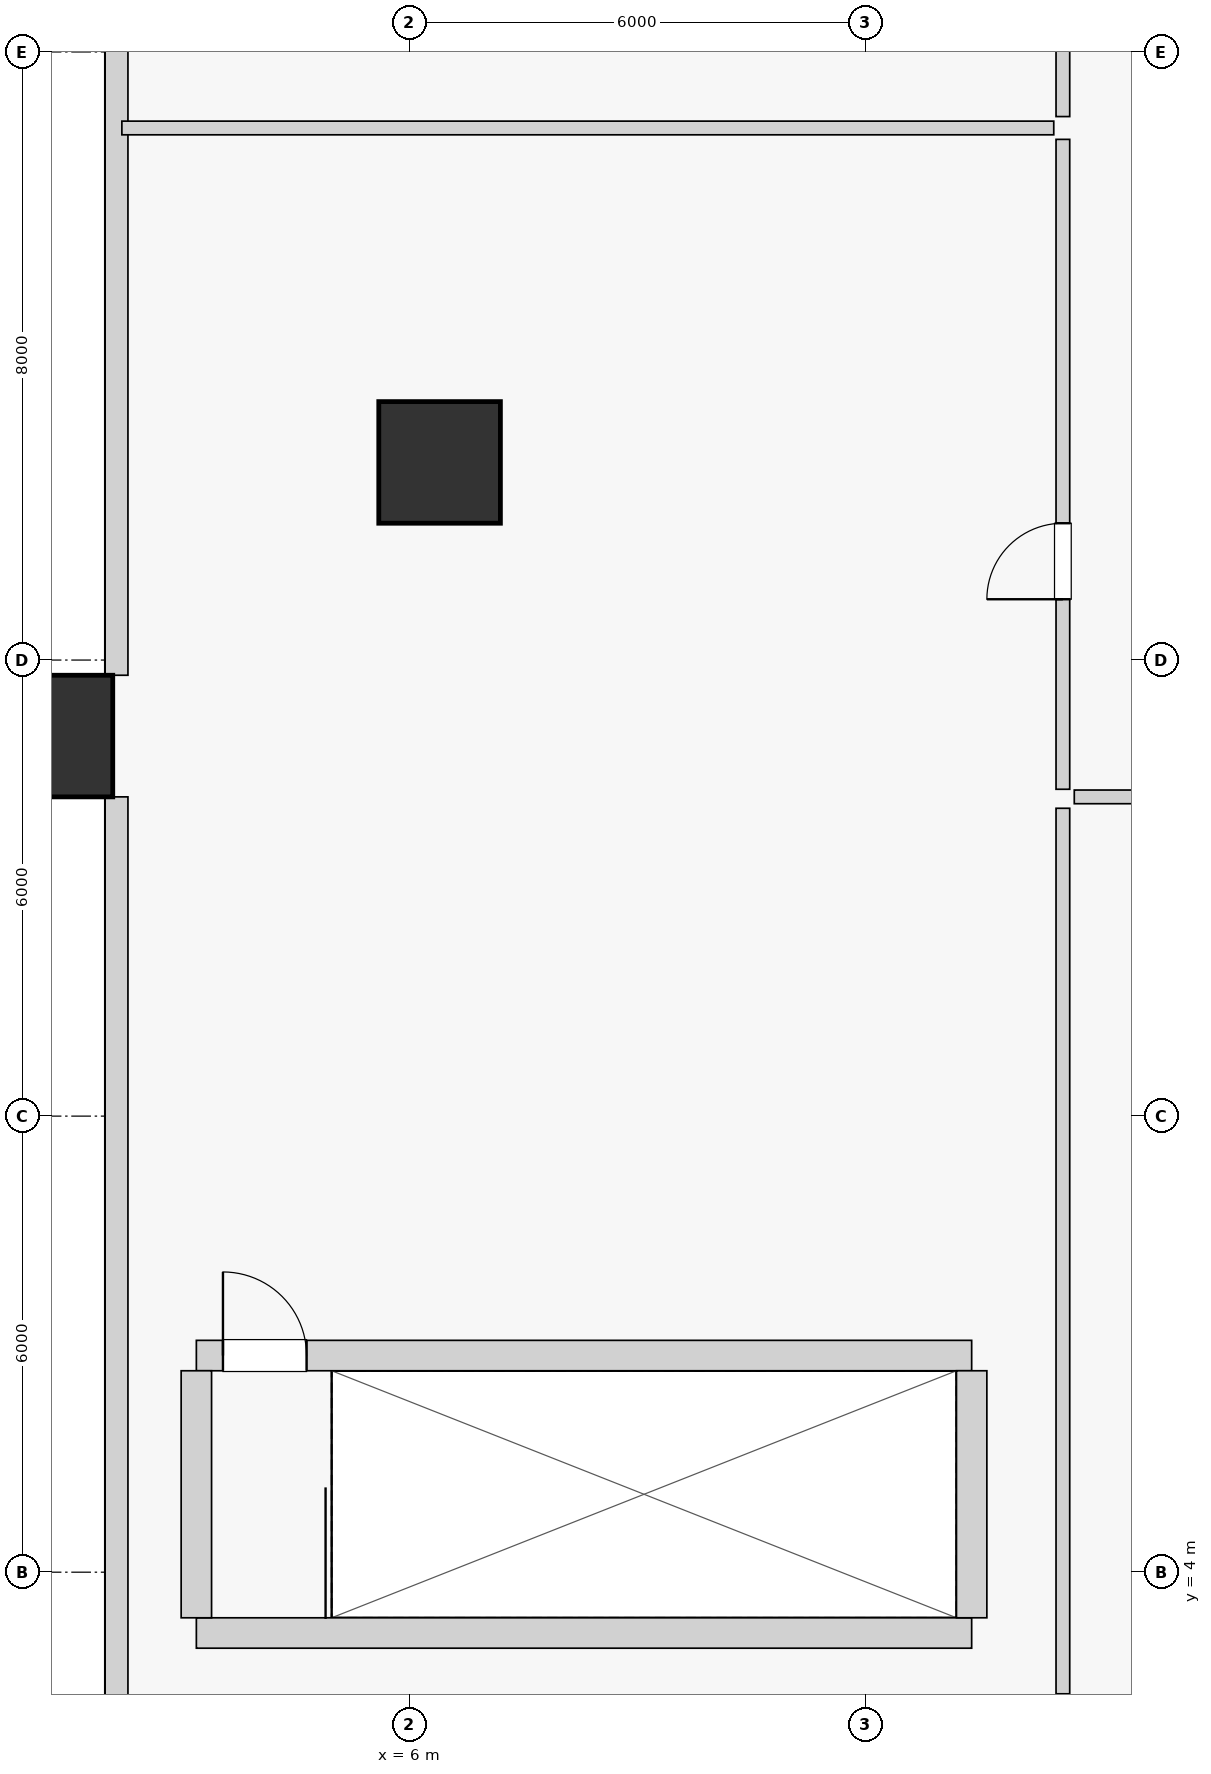
"""IFC4 building model, lengths in metres.
Left out: names, types, materials, properties, quantities, classifications, styles, units other than length and angle.
Written with IfcOpenShell. Run it as: python <this file> out.ifc"""

import sys

from ifc_helpers import new_model, si_unit, direction, frame, frame_2d, origin, origin_2d, place, context, subcontext, project, spatial, rectangle, extrude, source, transform, mapped, element, fill, save


model = new_model("IFC4")
c1 = context("Model", 3, precision=1e-05, world=origin(), true_north=direction((0.0, 1.0)))
c2 = subcontext(c1, "Body", "Model", "MODEL_VIEW")
j1 = project(units=[si_unit("LENGTHUNIT", "METRE"), si_unit("PLANEANGLEUNIT", "RADIAN")], contexts=[c1])
p1 = place(None, origin())
s1 = spatial("IfcSite", under=j1, at=p1, CompositionType="ELEMENT")
p2 = place(p1, origin())
s2 = spatial("IfcBuilding", under=s1, at=p2, CompositionType="ELEMENT")
p3 = place(p2, frame((0.0, 0.0, 18.4)))
s3 = spatial("IfcBuildingStorey", under=s2, at=p3, CompositionType="ELEMENT", Elevation=18.4)
for number, where, z_axis, x_axis in (
    (1, (1.3, 15.0, 0.0), (0.0, 0.0, 1.0), (1.0, 0.0, 0.0)),
    (2, (6.4, 18.6, 0.0), (0.0, 0.0, 1.0), (1.0, 0.0, 0.0)),
):
    element("IfcColumn", number, at=place(p3, frame(where, z_axis=z_axis, x_axis=x_axis)), inside=s3, PredefinedType="COLUMN", context=c2, shape_type="SweptSolid", body=[
        extrude(rectangle(XDim=1.6, YDim=1.6, at=origin_2d()), origin(), (0.0, 0.0, 1.0), 4.4),
    ])
p4 = place(p3, frame((2.15, 32.2, 0.0), z_axis=(0.0, 0.0, 1.0), x_axis=(0.0, -1.0, 0.0)))
e3 = element("IfcWall", 3, at=p4, inside=s3, PredefinedType="SOLIDWALL", context=c2, shape_type="SweptSolid", body=[
    extrude(rectangle(XDim=16.4, YDim=0.3, at=frame_2d((8.2, 0.0))), origin(), (0.0, 0.0, 1.0), 2.95),
])
p5 = place(p4, frame((7.15, 0.0, 0.85)))
e4 = element("IfcOpeningElement", 4, at=p5, cuts=e3, PredefinedType="OPENING", context=c2, shape_type="SweptSolid", body=[
    extrude(rectangle(XDim=2.1, YDim=1.75, at=frame_2d((1.05, 0.875))), frame((0.0, 0.16, 0.0), z_axis=(0.0, -1.0, 0.0), x_axis=(1.0, 0.0, 0.0)), (0.0, 0.0, 1.0), 0.32),
])
p6 = place(p3, frame((2.15, 14.2, 0.0), z_axis=(0.0, 0.0, 1.0), x_axis=(0.0, -1.0, 0.0)))
e5 = element("IfcWall", 5, at=p6, inside=s3, PredefinedType="SOLIDWALL", context=c2, shape_type="SweptSolid", body=[
    extrude(rectangle(XDim=11.9, YDim=0.3, at=frame_2d((5.95, 0.0))), origin(), (0.0, 0.0, 1.0), 2.95),
])
p7 = place(p6, frame((4.75, 0.0, 0.85)))
e6 = element("IfcOpeningElement", 6, at=p7, cuts=e5, PredefinedType="OPENING", context=c2, shape_type="SweptSolid", body=[
    extrude(rectangle(XDim=2.1, YDim=1.75, at=frame_2d((1.05, 0.875))), frame((0.0, 0.16, 0.0), z_axis=(0.0, -1.0, 0.0), x_axis=(1.0, 0.0, 0.0)), (0.0, 0.0, 1.0), 0.32),
])
p8 = place(p3, frame((3.2, 3.2, 0.0), z_axis=(0.0, 0.0, 1.0), x_axis=(1.0, 0.0, 0.0)))
e7 = element("IfcWall", 7, at=p8, inside=s3, PredefinedType="SHEAR", context=c2, shape_type="SweptSolid", body=[
    extrude(rectangle(XDim=10.2, YDim=0.4, at=frame_2d((5.1, 0.0))), origin(), (0.0, 0.0, 1.0), 4.05),
])
p9 = place(p3, frame((3.2, 6.85, 0.0), z_axis=(0.0, 0.0, 1.0), x_axis=(1.0, 0.0, 0.0)))
e8 = element("IfcWall", 8, at=p9, inside=s3, PredefinedType="SHEAR", context=c2, shape_type="SweptSolid", body=[
    extrude(rectangle(XDim=10.2, YDim=0.4, at=frame_2d((5.1, 0.0))), origin(), (0.0, 0.0, 1.0), 4.05),
])
p10 = place(p9, frame((0.35, 0.0, 0.0)))
e9 = element("IfcOpeningElement", 9, at=p10, cuts=e8, PredefinedType="OPENING", context=c2, shape_type="SweptSolid", body=[
    extrude(rectangle(XDim=1.1, YDim=2.03, at=frame_2d((0.55, 1.015))), frame((0.0, 0.21, 0.0), z_axis=(0.0, -1.0, 0.0), x_axis=(1.0, 0.0, 0.0)), (0.0, 0.0, 1.0), 0.42),
])
for number, where, z_axis, x_axis in (
    (10, (3.2, 3.4, 0.0), (0.0, 0.0, 1.0), (0.0, 1.0, 0.0)),
    (11, (13.4, 3.4, 0.0), (0.0, 0.0, 1.0), (0.0, 1.0, 0.0)),
):
    element("IfcWall", number, at=place(p3, frame(where, z_axis=z_axis, x_axis=x_axis)), inside=s3, PredefinedType="SHEAR", context=c2, shape_type="SweptSolid", body=[
        extrude(rectangle(XDim=3.25, YDim=0.4, at=frame_2d((1.625, 0.0))), origin(), (0.0, 0.0, 1.0), 4.05),
    ])
p11 = place(p3, frame((14.6, 14.3, 0.0), z_axis=(0.0, 0.0, 1.0), x_axis=(0.0, 1.0, 0.0)))
e12 = element("IfcWall", 12, at=p11, inside=s3, PredefinedType="PARTITIONING", context=c2, shape_type="SweptSolid", body=[
    extrude(rectangle(XDim=8.55, YDim=0.18, at=frame_2d((4.275, 0.0))), origin(), (0.0, 0.0, 1.0), 4.05),
])
p12 = place(p11, frame((2.5, 0.0, 0.0)))
e13 = element("IfcOpeningElement", 13, at=p12, cuts=e12, PredefinedType="OPENING", context=c2, shape_type="SweptSolid", body=[
    extrude(rectangle(XDim=1.0, YDim=2.01, at=frame_2d((0.5, 1.005))), frame((0.0, 0.1, 0.0), z_axis=(0.0, -1.0, 0.0), x_axis=(1.0, 0.0, 0.0)), (0.0, 0.0, 1.0), 0.2),
])
p13 = place(p3, frame((14.6, 23.15, 0.0), z_axis=(0.0, 0.0, 1.0), x_axis=(0.0, 1.0, 0.0)))
e14 = element("IfcWall", 14, at=p13, inside=s3, PredefinedType="PARTITIONING", context=c2, shape_type="SweptSolid", body=[
    extrude(rectangle(XDim=10.35, YDim=0.18, at=frame_2d((5.175, 0.0))), origin(), (0.0, 0.0, 1.0), 4.05),
])
p14 = place(p13, frame((2.5, 0.0, 0.0)))
e15 = element("IfcOpeningElement", 15, at=p14, cuts=e14, PredefinedType="OPENING", context=c2, shape_type="SweptSolid", body=[
    extrude(rectangle(XDim=1.0, YDim=2.01, at=frame_2d((0.5, 1.005))), frame((0.0, 0.1, 0.0), z_axis=(0.0, -1.0, 0.0), x_axis=(1.0, 0.0, 0.0)), (0.0, 0.0, 1.0), 0.2),
])
p15 = place(p3, frame((2.22, 23.0, 0.0), z_axis=(0.0, 0.0, 1.0), x_axis=(1.0, 0.0, 0.0)))
e16 = element("IfcWall", 16, at=p15, inside=s3, PredefinedType="PARTITIONING", context=c2, shape_type="SweptSolid", body=[
    extrude(rectangle(XDim=12.26, YDim=0.18, at=frame_2d((6.13, 0.0))), origin(), (0.0, 0.0, 1.0), 4.05),
])
p16 = place(p3, frame((14.6, 2.4, 0.0), z_axis=(0.0, 0.0, 1.0), x_axis=(0.0, 1.0, 0.0)))
e17 = element("IfcWall", 17, at=p16, inside=s3, PredefinedType="PARTITIONING", context=c2, shape_type="SweptSolid", body=[
    extrude(rectangle(XDim=11.65, YDim=0.18, at=frame_2d((5.825, 0.0))), origin(), (0.0, 0.0, 1.0), 4.05),
])
p17 = place(p3, frame((14.75, 14.2, 0.0), z_axis=(0.0, 0.0, 1.0), x_axis=(1.0, 0.0, 0.0)))
e18 = element("IfcWall", 18, at=p17, inside=s3, PredefinedType="PARTITIONING", context=c2, shape_type="SweptSolid", body=[
    extrude(rectangle(XDim=11.6, YDim=0.18, at=frame_2d((5.8, 0.0))), origin(), (0.0, 0.0, 1.0), 4.05),
])
p18 = place(p17, frame((2.5, 0.0, 0.0)))
e19 = element("IfcOpeningElement", 19, at=p18, cuts=e18, PredefinedType="OPENING", context=c2, shape_type="SweptSolid", body=[
    extrude(rectangle(XDim=1.0, YDim=2.01, at=frame_2d((0.5, 1.005))), frame((0.0, 0.1, 0.0), z_axis=(0.0, -1.0, 0.0), x_axis=(1.0, 0.0, 0.0)), (0.0, 0.0, 1.0), 0.2),
])
m1 = source(origin(), c2, "Body", "SweptSolid", [
    extrude(rectangle(XDim=2.1, YDim=1.75, at=frame_2d((1.05, 0.875))), frame((0.0, 0.03, 0.0), z_axis=(0.0, -1.0, 0.0), x_axis=(1.0, 0.0, 0.0)), (0.0, 0.0, 1.0), 0.06),
])
p19 = place(p5, origin())
e20 = element("IfcWindow", 20, at=p19, inside=s3, PartitioningType="DOUBLE_PANEL_VERTICAL", PredefinedType="WINDOW", context=c2, shape_type="MappedRepresentation", body=[
    mapped(m1, transform((0.0, 0.0, 0.0), scale=1.0)),
])
fill(e4, e20)
p20 = place(p7, origin())
e21 = element("IfcWindow", 21, at=p20, inside=s3, PartitioningType="DOUBLE_PANEL_VERTICAL", PredefinedType="WINDOW", context=c2, shape_type="MappedRepresentation", body=[
    mapped(m1, transform((0.0, 0.0, 0.0), scale=1.0)),
])
fill(e6, e21)
m2 = source(origin(), c2, "Body", "SweptSolid", [
    extrude(rectangle(XDim=1.1, YDim=2.03, at=frame_2d((0.55, 1.015))), frame((0.0, 0.025, 0.0), z_axis=(0.0, -1.0, 0.0), x_axis=(1.0, 0.0, 0.0)), (0.0, 0.0, 1.0), 0.05),
])
p21 = place(p10, origin())
e22 = element("IfcDoor", 22, at=p21, inside=s3, OperationType="SINGLE_SWING_LEFT", PredefinedType="DOOR", context=c2, shape_type="MappedRepresentation", body=[
    mapped(m2, transform((0.0, 0.0, 0.0), scale=1.0)),
])
fill(e9, e22)
m3 = source(origin(), c2, "Body", "SweptSolid", [
    extrude(rectangle(XDim=1.0, YDim=2.01, at=frame_2d((0.5, 1.005))), frame((0.0, 0.025, 0.0), z_axis=(0.0, -1.0, 0.0), x_axis=(1.0, 0.0, 0.0)), (0.0, 0.0, 1.0), 0.05),
])
p22 = place(p12, origin())
e23 = element("IfcDoor", 23, at=p22, inside=s3, OperationType="SINGLE_SWING_LEFT", PredefinedType="DOOR", context=c2, shape_type="MappedRepresentation", body=[
    mapped(m3, transform((0.0, 0.0, 0.0), scale=1.0)),
])
fill(e13, e23)
save(model, sys.argv[1])
